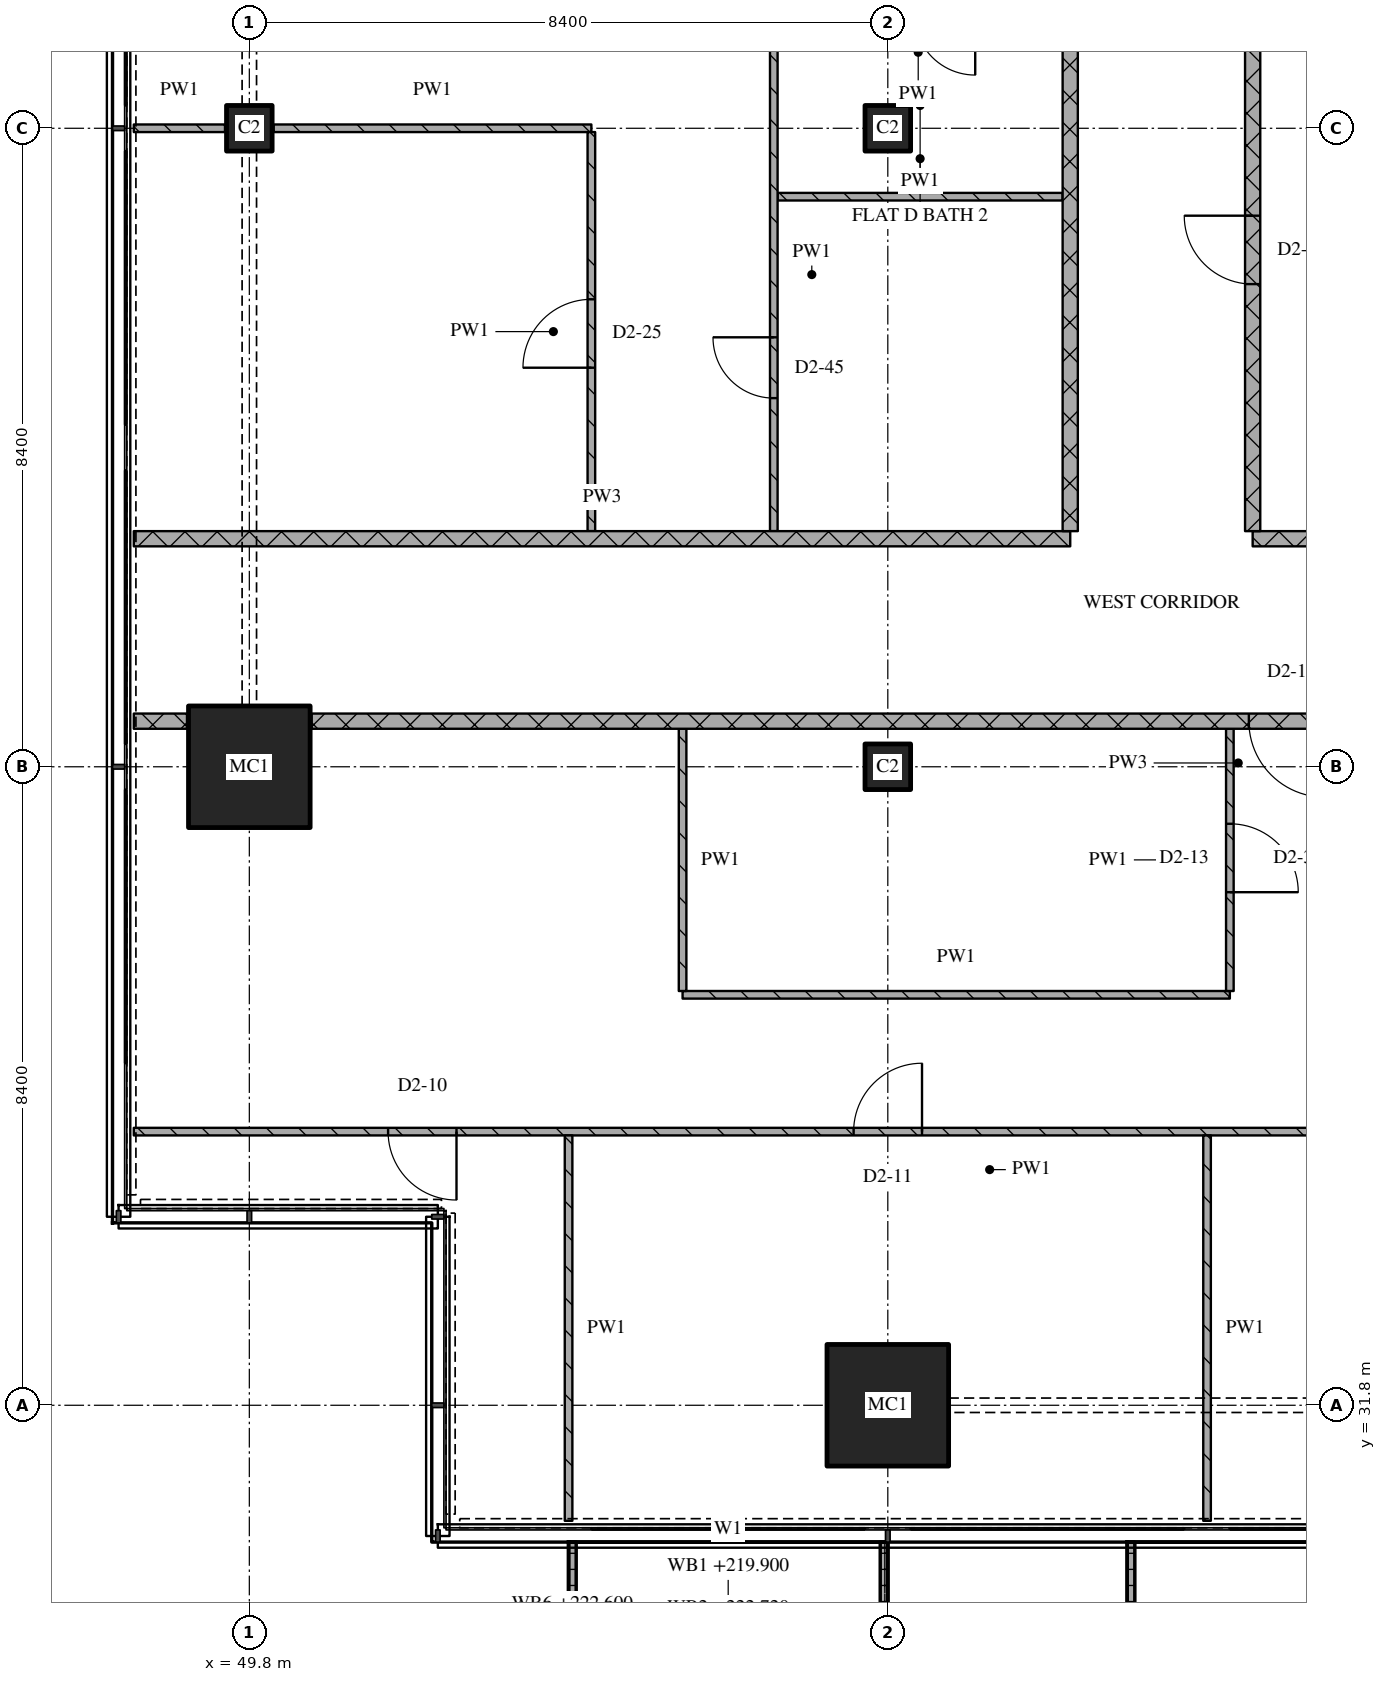
"""IFC4 building model, lengths in metres.
Left out: names, types, materials, properties, quantities, classifications, styles, units other than length and angle.
Written with IfcOpenShell. Run it as: python <this file> out.ifc"""

import sys

from ifc_helpers import new_model, si_unit, direction, frame, frame_2d, origin, origin_2d, place, context, subcontext, project, spatial, polyline, rectangle, outline, extrude, element, fill, save


model = new_model("IFC4")
c1 = context("Model", 3, precision=1e-05, world=origin(), true_north=direction((0.0, 1.0)))
c2 = subcontext(c1, "Body", "Model", "MODEL_VIEW")
j1 = project(units=[si_unit("LENGTHUNIT", "METRE"), si_unit("PLANEANGLEUNIT", "RADIAN")], contexts=[c1])
p1 = place(None, origin())
s1 = spatial("IfcSite", under=j1, at=p1, CompositionType="ELEMENT")
p2 = place(p1, origin())
s2 = spatial("IfcBuilding", under=s1, at=p2, CompositionType="ELEMENT")
p3 = place(p2, frame((0.0, 0.0, 219.9)))
s3 = spatial("IfcBuildingStorey", under=s2, at=p3, CompositionType="ELEMENT", Elevation=219.9)
p4 = place(p3, frame((49.8, 40.2, 0.0), z_axis=(0.0, 0.0, 1.0), x_axis=(1.0, 0.0, 0.0)))
e1 = element("IfcColumn", 1, at=p4, inside=s3, PredefinedType="COLUMN", context=c2, shape_type="SweptSolid", body=[
    extrude(rectangle(XDim=1.6, YDim=1.6, at=origin_2d()), origin(), (0.0, 0.0, 1.0), 3.6),
])
p5 = place(p3, frame((49.8, 48.6, 0.0), z_axis=(0.0, 0.0, 1.0), x_axis=(1.0, 0.0, 0.0)))
e2 = element("IfcColumn", 2, at=p5, inside=s3, PredefinedType="COLUMN", context=c2, shape_type="SweptSolid", body=[
    extrude(rectangle(XDim=0.6, YDim=0.6, at=origin_2d()), origin(), (0.0, 0.0, 1.0), 3.6),
])
p6 = place(p3, frame((58.2, 31.8, 0.0), z_axis=(0.0, 0.0, 1.0), x_axis=(1.0, 0.0, 0.0)))
e3 = element("IfcColumn", 3, at=p6, inside=s3, PredefinedType="COLUMN", context=c2, shape_type="SweptSolid", body=[
    extrude(rectangle(XDim=1.6, YDim=1.6, at=origin_2d()), origin(), (0.0, 0.0, 1.0), 3.6),
])
for number, where, z_axis, x_axis in (
    (4, (58.2, 40.2, 0.0), (0.0, 0.0, 1.0), (1.0, 0.0, 0.0)),
    (5, (58.2, 48.6, 0.0), (0.0, 0.0, 1.0), (1.0, 0.0, 0.0)),
):
    element("IfcColumn", number, at=place(p3, frame(where, z_axis=z_axis, x_axis=x_axis)), inside=s3, PredefinedType="COLUMN", context=c2, shape_type="SweptSolid", body=[
        extrude(rectangle(XDim=0.6, YDim=0.6, at=origin_2d()), origin(), (0.0, 0.0, 1.0), 3.6),
    ])
p7 = place(p3, origin())
e6 = element("IfcWall", 6, at=p7, inside=s3, PredefinedType="SOLIDWALL", context=c2, shape_type="SweptSolid", body=[
    extrude(outline(polyline([(54.0, 30.0), (54.1, 30.0), (54.1, 28.367), (58.1, 28.367), (58.1, 30.0), (58.2, 30.0), (58.2, 28.267), (54.0, 28.267), (54.0, 30.0)])), origin(), (0.0, 0.0, 1.0), 1.0),
])
p8 = place(p3, origin())
e7 = element("IfcWall", 7, at=p8, inside=s3, PredefinedType="SOLIDWALL", context=c2, shape_type="SweptSolid", body=[
    extrude(outline(polyline([(61.35, 30.0), (61.45, 30.0), (61.45, 28.233), (67.55, 28.233), (67.55, 30.0), (67.65, 30.0), (67.65, 28.133), (61.35, 28.133), (61.35, 30.0)])), origin(), (0.0, 0.0, 1.0), 1.0),
])
p9 = place(p3, frame((70.8, 35.4, 0.0), z_axis=(0.0, 0.0, 1.0), x_axis=(-1.0, 0.0, 0.0)))
e8 = element("IfcWall", 8, at=p9, inside=s3, PredefinedType="PARTITIONING", context=c2, shape_type="SweptSolid", body=[
    extrude(rectangle(XDim=22.52, YDim=0.1, at=frame_2d((11.26, 0.0))), origin(), (0.0, 0.0, 1.0), 3.32),
])
p10 = place(p9, frame((12.15, 0.0, 0.0)))
e9 = element("IfcOpeningElement", 9, at=p10, cuts=e8, PredefinedType="OPENING", context=c2, shape_type="SweptSolid", body=[
    extrude(rectangle(XDim=0.9, YDim=2.1, at=frame_2d((0.45, 1.05))), frame((0.0, 0.06, 0.0), z_axis=(0.0, -1.0, 0.0), x_axis=(1.0, 0.0, 0.0)), (0.0, 0.0, 1.0), 0.12),
])
p11 = place(p9, frame((18.274, 0.0, 0.0)))
e10 = element("IfcOpeningElement", 10, at=p11, cuts=e8, PredefinedType="OPENING", context=c2, shape_type="SweptSolid", body=[
    extrude(rectangle(XDim=0.9, YDim=2.1, at=frame_2d((0.45, 1.05))), frame((0.0, 0.06, 0.0), z_axis=(0.0, -1.0, 0.0), x_axis=(1.0, 0.0, 0.0)), (0.0, 0.0, 1.0), 0.12),
])
p12 = place(p3, frame((55.5, 37.2, 0.0), z_axis=(0.0, 0.0, 1.0), x_axis=(1.0, 0.0, 0.0)))
e11 = element("IfcWall", 11, at=p12, inside=s3, PredefinedType="PARTITIONING", context=c2, shape_type="SweptSolid", body=[
    extrude(rectangle(XDim=7.2, YDim=0.1, at=frame_2d((3.6, 0.0))), origin(), (0.0, 0.0, 1.0), 3.32),
])
p13 = place(p3, frame((48.28, 40.8, 0.0), z_axis=(0.0, 0.0, 1.0), x_axis=(1.0, 0.0, 0.0)))
e12 = element("IfcWall", 12, at=p13, inside=s3, PredefinedType="PARTITIONING", context=c2, shape_type="SweptSolid", body=[
    extrude(rectangle(XDim=0.7, YDim=0.2, at=frame_2d((0.35, 0.0))), origin(), (0.0, 0.0, 1.0), 3.32),
])
p14 = place(p3, frame((75.0, 40.8, 0.0), z_axis=(0.0, 0.0, 1.0), x_axis=(-1.0, 0.0, 0.0)))
e13 = element("IfcWall", 13, at=p14, inside=s3, PredefinedType="PARTITIONING", context=c2, shape_type="SweptSolid", body=[
    extrude(rectangle(XDim=24.38, YDim=0.2, at=frame_2d((12.19, 0.0))), origin(), (0.0, 0.0, 1.0), 3.32),
])
p15 = place(p14, frame((11.05, 0.0, 0.0)))
e14 = element("IfcOpeningElement", 14, at=p15, cuts=e13, PredefinedType="OPENING", context=c2, shape_type="SweptSolid", body=[
    extrude(rectangle(XDim=1.0, YDim=2.1, at=frame_2d((0.5, 1.05))), frame((0.0, 0.11, 0.0), z_axis=(0.0, -1.0, 0.0), x_axis=(1.0, 0.0, 0.0)), (0.0, 0.0, 1.0), 0.22),
])
p16 = place(p3, frame((48.28, 43.2, 0.0), z_axis=(0.0, 0.0, 1.0), x_axis=(1.0, 0.0, 0.0)))
e15 = element("IfcWall", 15, at=p16, inside=s3, PredefinedType="PARTITIONING", context=c2, shape_type="SweptSolid", body=[
    extrude(rectangle(XDim=12.32, YDim=0.2, at=frame_2d((6.16, 0.0))), origin(), (0.0, 0.0, 1.0), 3.32),
])
p17 = place(p3, frame((63.0, 43.2, 0.0), z_axis=(0.0, 0.0, 1.0), x_axis=(1.0, 0.0, 0.0)))
e16 = element("IfcWall", 16, at=p17, inside=s3, PredefinedType="PARTITIONING", context=c2, shape_type="SweptSolid", body=[
    extrude(rectangle(XDim=5.2, YDim=0.2, at=frame_2d((2.6, 0.0))), origin(), (0.0, 0.0, 1.0), 3.32),
])
p18 = place(p3, frame((56.75, 47.7, 0.0), z_axis=(0.0, 0.0, 1.0), x_axis=(1.0, 0.0, 0.0)))
e17 = element("IfcWall", 17, at=p18, inside=s3, PredefinedType="PARTITIONING", context=c2, shape_type="SweptSolid", body=[
    extrude(rectangle(XDim=3.75, YDim=0.1, at=frame_2d((1.875, 0.0))), origin(), (0.0, 0.0, 1.0), 3.32),
])
p19 = place(p3, frame((48.28, 48.6, 0.0), z_axis=(0.0, 0.0, 1.0), x_axis=(1.0, 0.0, 0.0)))
e18 = element("IfcWall", 18, at=p19, inside=s3, PredefinedType="PARTITIONING", context=c2, shape_type="SweptSolid", body=[
    extrude(rectangle(XDim=1.2, YDim=0.1, at=frame_2d((0.6, 0.0))), origin(), (0.0, 0.0, 1.0), 3.32),
])
p20 = place(p3, frame((50.12, 48.6, 0.0), z_axis=(0.0, 0.0, 1.0), x_axis=(1.0, 0.0, 0.0)))
e19 = element("IfcWall", 19, at=p20, inside=s3, PredefinedType="PARTITIONING", context=c2, shape_type="SweptSolid", body=[
    extrude(rectangle(XDim=4.18, YDim=0.1, at=frame_2d((2.09, 0.0))), origin(), (0.0, 0.0, 1.0), 3.32),
])
p21 = place(p3, frame((54.0, 35.35, 0.0), z_axis=(0.0, 0.0, 1.0), x_axis=(0.0, -1.0, 0.0)))
e20 = element("IfcWall", 20, at=p21, inside=s3, PredefinedType="PARTITIONING", context=c2, shape_type="SweptSolid", body=[
    extrude(rectangle(XDim=5.07, YDim=0.1, at=frame_2d((2.535, 0.0))), origin(), (0.0, 0.0, 1.0), 3.32),
])
p22 = place(p3, frame((54.3, 43.3, 0.0), z_axis=(0.0, 0.0, 1.0), x_axis=(0.0, 1.0, 0.0)))
e21 = element("IfcWall", 21, at=p22, inside=s3, PredefinedType="PARTITIONING", context=c2, shape_type="SweptSolid", body=[
    extrude(rectangle(XDim=5.25, YDim=0.1, at=frame_2d((2.625, 0.0))), origin(), (0.0, 0.0, 1.0), 3.32),
])
p23 = place(p22, frame((2.15, 0.0, 0.0)))
e22 = element("IfcOpeningElement", 22, at=p23, cuts=e21, PredefinedType="OPENING", context=c2, shape_type="SweptSolid", body=[
    extrude(rectangle(XDim=0.9, YDim=2.1, at=frame_2d((0.45, 1.05))), frame((0.0, 0.06, 0.0), z_axis=(0.0, -1.0, 0.0), x_axis=(1.0, 0.0, 0.0)), (0.0, 0.0, 1.0), 0.12),
])
p24 = place(p3, frame((55.5, 40.7, 0.0), z_axis=(0.0, 0.0, 1.0), x_axis=(0.0, -1.0, 0.0)))
e23 = element("IfcWall", 23, at=p24, inside=s3, PredefinedType="PARTITIONING", context=c2, shape_type="SweptSolid", body=[
    extrude(rectangle(XDim=3.45, YDim=0.1, at=frame_2d((1.725, 0.0))), origin(), (0.0, 0.0, 1.0), 3.32),
])
p25 = place(p3, frame((56.7, 50.05, 0.0), z_axis=(0.0, 0.0, 1.0), x_axis=(0.0, -1.0, 0.0)))
e24 = element("IfcWall", 24, at=p25, inside=s3, PredefinedType="PARTITIONING", context=c2, shape_type="SweptSolid", body=[
    extrude(rectangle(XDim=6.75, YDim=0.1, at=frame_2d((3.375, 0.0))), origin(), (0.0, 0.0, 1.0), 3.32),
])
p26 = place(p25, frame((4.2, 0.0, 0.0)))
e25 = element("IfcOpeningElement", 25, at=p26, cuts=e24, PredefinedType="OPENING", context=c2, shape_type="SweptSolid", body=[
    extrude(rectangle(XDim=0.8, YDim=2.1, at=frame_2d((0.4, 1.05))), frame((0.0, 0.06, 0.0), z_axis=(0.0, -1.0, 0.0), x_axis=(1.0, 0.0, 0.0)), (0.0, 0.0, 1.0), 0.12),
])
p27 = place(p3, frame((60.6, 43.3, 0.0), z_axis=(0.0, 0.0, 1.0), x_axis=(0.0, 1.0, 0.0)))
e26 = element("IfcWall", 26, at=p27, inside=s3, PredefinedType="PARTITIONING", context=c2, shape_type="SweptSolid", body=[
    extrude(rectangle(XDim=17.8, YDim=0.2, at=frame_2d((8.9, 0.0))), origin(), (0.0, 0.0, 1.0), 3.32),
])
p28 = place(p27, frame((7.05, 0.0, 0.0)))
e27 = element("IfcOpeningElement", 27, at=p28, cuts=e26, PredefinedType="OPENING", context=c2, shape_type="SweptSolid", body=[
    extrude(rectangle(XDim=1.0, YDim=2.1, at=frame_2d((0.5, 1.05))), frame((0.0, 0.11, 0.0), z_axis=(0.0, -1.0, 0.0), x_axis=(1.0, 0.0, 0.0)), (0.0, 0.0, 1.0), 0.22),
])
p29 = place(p3, frame((62.4, 35.35, 0.0), z_axis=(0.0, 0.0, 1.0), x_axis=(0.0, -1.0, 0.0)))
e28 = element("IfcWall", 28, at=p29, inside=s3, PredefinedType="PARTITIONING", context=c2, shape_type="SweptSolid", body=[
    extrude(rectangle(XDim=5.07, YDim=0.1, at=frame_2d((2.535, 0.0))), origin(), (0.0, 0.0, 1.0), 3.32),
])
p30 = place(p3, frame((62.7, 37.25, 0.0), z_axis=(0.0, 0.0, 1.0), x_axis=(0.0, 1.0, 0.0)))
e29 = element("IfcWall", 29, at=p30, inside=s3, PredefinedType="PARTITIONING", context=c2, shape_type="SweptSolid", body=[
    extrude(rectangle(XDim=3.45, YDim=0.1, at=frame_2d((1.725, 0.0))), origin(), (0.0, 0.0, 1.0), 3.32),
])
p31 = place(p30, frame((1.3, 0.0, 0.0)))
e30 = element("IfcOpeningElement", 30, at=p31, cuts=e29, PredefinedType="OPENING", context=c2, shape_type="SweptSolid", body=[
    extrude(rectangle(XDim=0.9, YDim=2.1, at=frame_2d((0.45, 1.05))), frame((0.0, 0.06, 0.0), z_axis=(0.0, -1.0, 0.0), x_axis=(1.0, 0.0, 0.0)), (0.0, 0.0, 1.0), 0.12),
])
p32 = place(p3, frame((63.0, 58.7, 0.0), z_axis=(0.0, 0.0, 1.0), x_axis=(0.0, -1.0, 0.0)))
e31 = element("IfcWall", 31, at=p32, inside=s3, PredefinedType="PARTITIONING", context=c2, shape_type="SweptSolid", body=[
    extrude(rectangle(XDim=15.4, YDim=0.2, at=frame_2d((7.7, 0.0))), origin(), (0.0, 0.0, 1.0), 3.32),
])
p33 = place(p32, frame((3.45, 0.0, 0.0)))
e32 = element("IfcOpeningElement", 32, at=p33, cuts=e31, PredefinedType="OPENING", context=c2, shape_type="SweptSolid", body=[
    extrude(rectangle(XDim=1.0, YDim=2.1, at=frame_2d((0.5, 1.05))), frame((0.0, 0.11, 0.0), z_axis=(0.0, -1.0, 0.0), x_axis=(1.0, 0.0, 0.0)), (0.0, 0.0, 1.0), 0.22),
])
p34 = place(p32, frame((11.25, 0.0, 0.0)))
e33 = element("IfcOpeningElement", 33, at=p34, cuts=e31, PredefinedType="OPENING", context=c2, shape_type="SweptSolid", body=[
    extrude(rectangle(XDim=0.9, YDim=2.1, at=frame_2d((0.45, 1.05))), frame((0.0, 0.11, 0.0), z_axis=(0.0, -1.0, 0.0), x_axis=(1.0, 0.0, 0.0)), (0.0, 0.0, 1.0), 0.22),
])
p35 = place(p10, origin())
e34 = element("IfcDoor", 34, at=p35, inside=s3, OperationType="SINGLE_SWING_RIGHT", PredefinedType="DOOR", context=c2, shape_type="SweptSolid", body=[
    extrude(rectangle(XDim=0.9, YDim=2.1, at=frame_2d((0.45, 1.05))), frame((0.0, 0.025, 0.0), z_axis=(0.0, -1.0, 0.0), x_axis=(1.0, 0.0, 0.0)), (0.0, 0.0, 1.0), 0.05),
])
fill(e9, e34)
p36 = place(p11, origin())
e35 = element("IfcDoor", 35, at=p36, inside=s3, OperationType="SINGLE_SWING_LEFT", PredefinedType="DOOR", context=c2, shape_type="SweptSolid", body=[
    extrude(rectangle(XDim=0.9, YDim=2.1, at=frame_2d((0.45, 1.05))), frame((0.0, 0.025, 0.0), z_axis=(0.0, -1.0, 0.0), x_axis=(1.0, 0.0, 0.0)), (0.0, 0.0, 1.0), 0.05),
])
fill(e10, e35)
p37 = place(p15, origin())
e36 = element("IfcDoor", 36, at=p37, inside=s3, OperationType="SINGLE_SWING_LEFT", PredefinedType="DOOR", context=c2, shape_type="SweptSolid", body=[
    extrude(rectangle(XDim=1.0, YDim=2.1, at=frame_2d((0.5, 1.05))), frame((0.0, 0.025, 0.0), z_axis=(0.0, -1.0, 0.0), x_axis=(1.0, 0.0, 0.0)), (0.0, 0.0, 1.0), 0.05),
])
fill(e14, e36)
p38 = place(p23, origin())
e37 = element("IfcDoor", 37, at=p38, inside=s3, OperationType="SINGLE_SWING_LEFT", PredefinedType="DOOR", context=c2, shape_type="SweptSolid", body=[
    extrude(rectangle(XDim=0.9, YDim=2.1, at=frame_2d((0.45, 1.05))), frame((0.0, 0.025, 0.0), z_axis=(0.0, -1.0, 0.0), x_axis=(1.0, 0.0, 0.0)), (0.0, 0.0, 1.0), 0.05),
])
fill(e22, e37)
p39 = place(p26, origin())
e38 = element("IfcDoor", 38, at=p39, inside=s3, OperationType="SINGLE_SWING_RIGHT", PredefinedType="DOOR", context=c2, shape_type="SweptSolid", body=[
    extrude(rectangle(XDim=0.8, YDim=2.1, at=frame_2d((0.4, 1.05))), frame((0.0, 0.025, 0.0), z_axis=(0.0, -1.0, 0.0), x_axis=(1.0, 0.0, 0.0)), (0.0, 0.0, 1.0), 0.05),
])
fill(e25, e38)
p40 = place(p31, origin())
e39 = element("IfcDoor", 39, at=p40, inside=s3, OperationType="SINGLE_SWING_RIGHT", PredefinedType="DOOR", context=c2, shape_type="SweptSolid", body=[
    extrude(rectangle(XDim=0.9, YDim=2.1, at=frame_2d((0.45, 1.05))), frame((0.0, 0.025, 0.0), z_axis=(0.0, -1.0, 0.0), x_axis=(1.0, 0.0, 0.0)), (0.0, 0.0, 1.0), 0.05),
])
fill(e30, e39)
p41 = place(p34, origin())
e40 = element("IfcDoor", 40, at=p41, inside=s3, OperationType="SINGLE_SWING_RIGHT", PredefinedType="DOOR", context=c2, shape_type="SweptSolid", body=[
    extrude(rectangle(XDim=0.9, YDim=2.1, at=frame_2d((0.45, 1.05))), frame((0.0, 0.025, 0.0), z_axis=(0.0, -1.0, 0.0), x_axis=(1.0, 0.0, 0.0)), (0.0, 0.0, 1.0), 0.05),
])
fill(e33, e40)
save(model, sys.argv[1])
